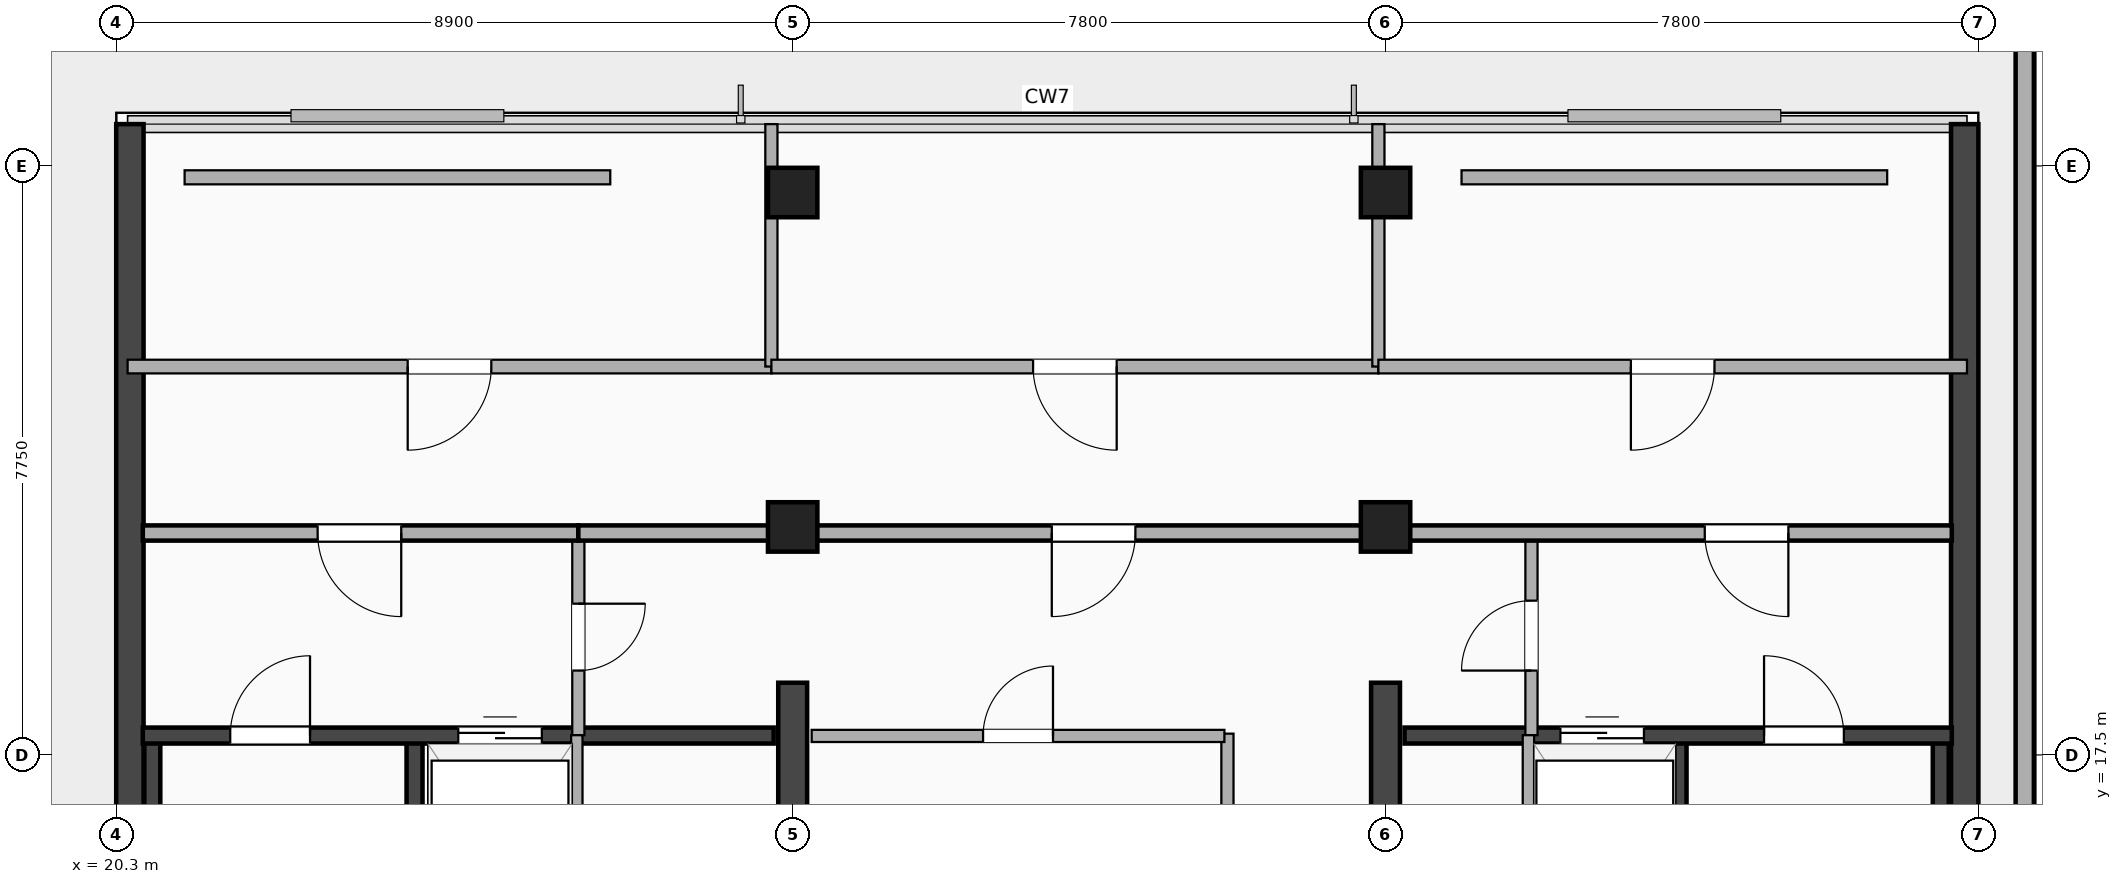
"""IFC4 building model, lengths in metres.
Left out: names, types, materials, properties, quantities, classifications, styles, units other than length and angle.
Written with IfcOpenShell. Run it as: python <this file> out.ifc"""

import sys

from ifc_helpers import new_model, si_unit, direction, frame, frame_2d, origin, origin_2d, place, context, subcontext, project, spatial, rectangle, extrude, element, fill, save


model = new_model("IFC4")
c1 = context("Model", 3, precision=1e-05, world=origin(), true_north=direction((0.0, 1.0)))
c2 = subcontext(c1, "Body", "Model", "MODEL_VIEW")
j1 = project(units=[si_unit("LENGTHUNIT", "METRE"), si_unit("PLANEANGLEUNIT", "RADIAN")], contexts=[c1])
p1 = place(None, origin())
s1 = spatial("IfcSite", under=j1, at=p1, CompositionType="ELEMENT")
p2 = place(p1, origin())
s2 = spatial("IfcBuilding", under=s1, at=p2, CompositionType="ELEMENT")
p3 = place(p2, frame((0.0, 0.0, 307.9)))
s3 = spatial("IfcBuildingStorey", under=s2, at=p3, CompositionType="ELEMENT", Elevation=307.9)
for number, where, z_axis, x_axis in (
    (1, (20.48, 3.5, 0.0), (0.0, 0.0, 1.0), (0.0, 1.0, 0.0)),
    (2, (44.62, 3.5, 0.0), (0.0, 0.0, 1.0), (0.0, 1.0, 0.0)),
):
    element("IfcWall", number, at=place(p3, frame(where, z_axis=z_axis, x_axis=x_axis)), inside=s3, PredefinedType="SHEAR", context=c2, shape_type="SweptSolid", body=[
        extrude(rectangle(XDim=22.3, YDim=0.36, at=frame_2d((11.15, 0.0))), origin(), (0.0, 0.0, 1.0), 4.3),
    ])
p4 = place(p3, frame((29.2, 3.5, 0.0), z_axis=(0.0, 0.0, 1.0), x_axis=(0.0, 1.0, 0.0)))
e3 = element("IfcWall", 3, at=p4, inside=s3, PredefinedType="SHEAR", context=c2, shape_type="SweptSolid", body=[
    extrude(rectangle(XDim=14.95, YDim=0.38, at=frame_2d((7.475, 0.0))), origin(), (0.0, 0.0, 1.0), 4.3),
])
p5 = place(p4, frame((7.75, 0.0, 0.0), z_axis=(0.0, 0.0, 1.0), x_axis=(-1.0, 0.0, 0.0)))
e4 = element("IfcOpeningElement", 4, at=p5, cuts=e3, PredefinedType="OPENING", context=c2, shape_type="SweptSolid", body=[
    extrude(rectangle(XDim=1.1, YDim=2.15, at=frame_2d((0.55, 1.075))), frame((0.0, 0.2, 0.0), z_axis=(0.0, -1.0, 0.0), x_axis=(1.0, 0.0, 0.0)), (0.0, 0.0, 1.0), 0.4),
])
p6 = place(p3, frame((37.0, 3.5, 0.0), z_axis=(0.0, 0.0, 1.0), x_axis=(0.0, 1.0, 0.0)))
e5 = element("IfcWall", 5, at=p6, inside=s3, PredefinedType="SHEAR", context=c2, shape_type="SweptSolid", body=[
    extrude(rectangle(XDim=14.95, YDim=0.38, at=frame_2d((7.475, 0.0))), origin(), (0.0, 0.0, 1.0), 4.3),
])
p7 = place(p6, frame((6.65, 0.0, 0.0)))
e6 = element("IfcOpeningElement", 6, at=p7, cuts=e5, PredefinedType="OPENING", context=c2, shape_type="SweptSolid", body=[
    extrude(rectangle(XDim=1.1, YDim=2.15, at=frame_2d((0.55, 1.075))), frame((0.0, 0.2, 0.0), z_axis=(0.0, -1.0, 0.0), x_axis=(1.0, 0.0, 0.0)), (0.0, 0.0, 1.0), 0.4),
])
for number, where, z_axis, x_axis in (
    (7, (20.775, 9.745, 0.0), (0.0, 0.0, 1.0), (0.0, 1.0, 0.0)),
    (8, (24.225, 9.745, 0.0), (0.0, 0.0, 1.0), (0.0, 1.0, 0.0)),
):
    element("IfcWall", number, at=place(p3, frame(where, z_axis=z_axis, x_axis=x_axis)), inside=s3, PredefinedType="SHEAR", context=c2, shape_type="SweptSolid", body=[
        extrude(rectangle(XDim=8.01, YDim=0.21, at=frame_2d((4.005, 0.0))), origin(), (0.0, 0.0, 1.0), 4.3),
    ])
p8 = place(p3, frame((20.65, 17.755, 0.0), z_axis=(0.0, 0.0, 1.0), x_axis=(1.0, 0.0, 0.0)))
e9 = element("IfcWall", 9, at=p8, inside=s3, PredefinedType="SHEAR", context=c2, shape_type="SweptSolid", body=[
    extrude(rectangle(XDim=8.3, YDim=0.21, at=frame_2d((4.15, 0.0))), origin(), (0.0, 0.0, 1.0), 4.3),
])
p9 = place(p8, frame((2.2, 0.0, 0.0), z_axis=(0.0, 0.0, 1.0), x_axis=(-1.0, 0.0, 0.0)))
e10 = element("IfcOpeningElement", 10, at=p9, cuts=e9, PredefinedType="OPENING", context=c2, shape_type="SweptSolid", body=[
    extrude(rectangle(XDim=1.05, YDim=2.15, at=frame_2d((0.525, 1.075))), frame((0.0, 0.115, 0.0), z_axis=(0.0, -1.0, 0.0), x_axis=(1.0, 0.0, 0.0)), (0.0, 0.0, 1.0), 0.23),
])
p10 = place(p8, frame((4.15, 0.0, 0.0)))
e11 = element("IfcOpeningElement", 11, at=p10, cuts=e9, PredefinedType="OPENING", context=c2, shape_type="SweptSolid", body=[
    extrude(rectangle(XDim=1.1, YDim=2.18, at=frame_2d((0.55, 1.09))), frame((0.0, 0.115, 0.0), z_axis=(0.0, -1.0, 0.0), x_axis=(1.0, 0.0, 0.0)), (0.0, 0.0, 1.0), 0.23),
])
for number, where, z_axis, x_axis in (
    (12, (40.855, 9.745, 0.0), (0.0, 0.0, 1.0), (0.0, 1.0, 0.0)),
    (13, (44.305, 9.745, 0.0), (0.0, 0.0, 1.0), (0.0, 1.0, 0.0)),
):
    element("IfcWall", number, at=place(p3, frame(where, z_axis=z_axis, x_axis=x_axis)), inside=s3, PredefinedType="SHEAR", context=c2, shape_type="SweptSolid", body=[
        extrude(rectangle(XDim=8.01, YDim=0.21, at=frame_2d((4.005, 0.0))), origin(), (0.0, 0.0, 1.0), 4.3),
    ])
p11 = place(p3, frame((37.25, 17.755, 0.0), z_axis=(0.0, 0.0, 1.0), x_axis=(1.0, 0.0, 0.0)))
e14 = element("IfcWall", 14, at=p11, inside=s3, PredefinedType="SHEAR", context=c2, shape_type="SweptSolid", body=[
    extrude(rectangle(XDim=7.2, YDim=0.21, at=frame_2d((3.6, 0.0))), origin(), (0.0, 0.0, 1.0), 4.3),
])
p12 = place(p11, frame((2.05, 0.0, 0.0)))
e15 = element("IfcOpeningElement", 15, at=p12, cuts=e14, PredefinedType="OPENING", context=c2, shape_type="SweptSolid", body=[
    extrude(rectangle(XDim=1.1, YDim=2.18, at=frame_2d((0.55, 1.09))), frame((0.0, 0.115, 0.0), z_axis=(0.0, -1.0, 0.0), x_axis=(1.0, 0.0, 0.0)), (0.0, 0.0, 1.0), 0.23),
])
p13 = place(p11, frame((5.78, 0.0, 0.0), z_axis=(0.0, 0.0, 1.0), x_axis=(-1.0, 0.0, 0.0)))
e16 = element("IfcOpeningElement", 16, at=p13, cuts=e14, PredefinedType="OPENING", context=c2, shape_type="SweptSolid", body=[
    extrude(rectangle(XDim=1.05, YDim=2.15, at=frame_2d((0.525, 1.075))), frame((0.0, 0.115, 0.0), z_axis=(0.0, -1.0, 0.0), x_axis=(1.0, 0.0, 0.0)), (0.0, 0.0, 1.0), 0.23),
])
for number, where, z_axis, x_axis in (
    (17, (29.2, 20.5, -0.3), (0.0, 0.0, 1.0), (1.0, 0.0, 0.0)),
    (18, (37.0, 20.5, -0.3), (0.0, 0.0, 1.0), (1.0, 0.0, 0.0)),
    (19, (29.2, 24.9, -0.3), (0.0, 0.0, 1.0), (1.0, 0.0, 0.0)),
    (20, (37.0, 24.9, -0.3), (0.0, 0.0, 1.0), (1.0, 0.0, 0.0)),
):
    element("IfcColumn", number, at=place(p3, frame(where, z_axis=z_axis, x_axis=x_axis)), inside=s3, PredefinedType="COLUMN", context=c2, shape_type="SweptSolid", body=[
        extrude(rectangle(XDim=0.65, YDim=0.65, at=origin_2d()), origin(), (0.0, 0.0, 1.0), 4.6),
    ])
p14 = place(p3, frame((45.41, 3.5, 0.0), z_axis=(0.0, 0.0, 1.0), x_axis=(0.0, 1.0, 0.0)))
e21 = element("IfcWall", 21, at=p14, inside=s3, PredefinedType="PARAPET", context=c2, shape_type="SweptSolid", body=[
    extrude(rectangle(XDim=23.6, YDim=0.24, at=frame_2d((11.8, 0.0))), origin(), (0.0, 0.0, 1.0), 1.25),
])
for number, where, z_axis, x_axis in (
    (22, (21.2, 25.1, 0.0), (0.0, 0.0, 1.0), (1.0, 0.0, 0.0)),
    (23, (38.0, 25.1, 0.0), (0.0, 0.0, 1.0), (1.0, 0.0, 0.0)),
):
    element("IfcWall", number, at=place(p3, frame(where, z_axis=z_axis, x_axis=x_axis)), inside=s3, PredefinedType="ELEMENTEDWALL", context=c2, shape_type="SweptSolid", body=[
        extrude(rectangle(XDim=5.6, YDim=0.185, at=frame_2d((2.8, 0.0))), origin(), (0.0, 0.0, 1.0), 3.885),
    ])
p15 = place(p3, frame((26.38, 17.76, 0.0), z_axis=(0.0, 0.0, 1.0), x_axis=(0.0, 1.0, 0.0)))
e24 = element("IfcWall", 24, at=p15, inside=s3, PredefinedType="PARTITIONING", context=c2, shape_type="SweptSolid", body=[
    extrude(rectangle(XDim=2.66, YDim=0.16, at=frame_2d((1.33, 0.0))), origin(), (0.0, 0.0, 1.0), 4.3),
])
p16 = place(p15, frame((0.85, 0.0, 0.0)))
e25 = element("IfcOpeningElement", 25, at=p16, cuts=e24, PredefinedType="OPENING", context=c2, shape_type="SweptSolid", body=[
    extrude(rectangle(XDim=0.88, YDim=2.08, at=frame_2d((0.44, 1.04))), frame((0.0, 0.09, 0.0), z_axis=(0.0, -1.0, 0.0), x_axis=(1.0, 0.0, 0.0)), (0.0, 0.0, 1.0), 0.18),
])
p17 = place(p3, frame((38.92, 17.76, 0.0), z_axis=(0.0, 0.0, 1.0), x_axis=(0.0, 1.0, 0.0)))
e26 = element("IfcWall", 26, at=p17, inside=s3, PredefinedType="PARTITIONING", context=c2, shape_type="SweptSolid", body=[
    extrude(rectangle(XDim=2.66, YDim=0.16, at=frame_2d((1.33, 0.0))), origin(), (0.0, 0.0, 1.0), 4.3),
])
p18 = place(p17, frame((1.77, 0.0, 0.0), z_axis=(0.0, 0.0, 1.0), x_axis=(-1.0, 0.0, 0.0)))
e27 = element("IfcOpeningElement", 27, at=p18, cuts=e26, PredefinedType="OPENING", context=c2, shape_type="SweptSolid", body=[
    extrude(rectangle(XDim=0.92, YDim=2.08, at=frame_2d((0.46, 1.04))), frame((0.0, 0.09, 0.0), z_axis=(0.0, -1.0, 0.0), x_axis=(1.0, 0.0, 0.0)), (0.0, 0.0, 1.0), 0.18),
])
for number, where, z_axis, x_axis in (
    (28, (26.36, 14.72, 0.0), (0.0, 0.0, 1.0), (0.0, 1.0, 0.0)),
    (29, (38.88, 14.72, 0.0), (0.0, 0.0, 1.0), (0.0, 1.0, 0.0)),
):
    element("IfcWall", number, at=place(p3, frame(where, z_axis=z_axis, x_axis=x_axis)), inside=s3, PredefinedType="PARTITIONING", context=c2, shape_type="SweptSolid", body=[
        extrude(rectangle(XDim=3.04, YDim=0.15, at=frame_2d((1.52, 0.0))), origin(), (0.0, 0.0, 1.0), 4.3),
    ])
p19 = place(p3, frame((20.65, 20.42, 0.0), z_axis=(0.0, 0.0, 1.0), x_axis=(1.0, 0.0, 0.0)))
e30 = element("IfcWall", 30, at=p19, inside=s3, PredefinedType="PARTITIONING", context=c2, shape_type="SweptSolid", body=[
    extrude(rectangle(XDim=5.73, YDim=0.2, at=frame_2d((2.865, 0.0))), origin(), (0.0, 0.0, 1.0), 4.3),
])
p20 = place(p19, frame((2.3, 0.0, 0.0)))
e31 = element("IfcOpeningElement", 31, at=p20, cuts=e30, PredefinedType="OPENING", context=c2, shape_type="SweptSolid", body=[
    extrude(rectangle(XDim=1.1, YDim=2.15, at=frame_2d((0.55, 1.075))), frame((0.0, 0.11, 0.0), z_axis=(0.0, -1.0, 0.0), x_axis=(1.0, 0.0, 0.0)), (0.0, 0.0, 1.0), 0.22),
])
p21 = place(p3, frame((26.38, 20.42, 0.0), z_axis=(0.0, 0.0, 1.0), x_axis=(1.0, 0.0, 0.0)))
e32 = element("IfcWall", 32, at=p21, inside=s3, PredefinedType="PARTITIONING", context=c2, shape_type="SweptSolid", body=[
    extrude(rectangle(XDim=2.82, YDim=0.2, at=frame_2d((1.41, 0.0))), origin(), (0.0, 0.0, 1.0), 2.605),
])
p22 = place(p3, frame((29.2, 20.42, 0.0), z_axis=(0.0, 0.0, 1.0), x_axis=(1.0, 0.0, 0.0)))
e33 = element("IfcWall", 33, at=p22, inside=s3, PredefinedType="PARTITIONING", context=c2, shape_type="SweptSolid", body=[
    extrude(rectangle(XDim=7.8, YDim=0.2, at=frame_2d((3.9, 0.0))), origin(), (0.0, 0.0, 1.0), 2.605),
])
p23 = place(p22, frame((3.409, 0.0, 0.0)))
e34 = element("IfcOpeningElement", 34, at=p23, cuts=e33, PredefinedType="OPENING", context=c2, shape_type="SweptSolid", body=[
    extrude(rectangle(XDim=1.1, YDim=2.15, at=frame_2d((0.55, 1.075))), frame((0.0, 0.11, 0.0), z_axis=(0.0, -1.0, 0.0), x_axis=(1.0, 0.0, 0.0)), (0.0, 0.0, 1.0), 0.22),
])
p24 = place(p3, frame((37.0, 20.42, 0.0), z_axis=(0.0, 0.0, 1.0), x_axis=(1.0, 0.0, 0.0)))
e35 = element("IfcWall", 35, at=p24, inside=s3, PredefinedType="PARTITIONING", context=c2, shape_type="SweptSolid", body=[
    extrude(rectangle(XDim=7.45, YDim=0.2, at=frame_2d((3.725, 0.0))), origin(), (0.0, 0.0, 1.0), 2.605),
])
p25 = place(p24, frame((4.2, 0.0, 0.0)))
e36 = element("IfcOpeningElement", 36, at=p25, cuts=e35, PredefinedType="OPENING", context=c2, shape_type="SweptSolid", body=[
    extrude(rectangle(XDim=1.1, YDim=2.15, at=frame_2d((0.55, 1.075))), frame((0.0, 0.11, 0.0), z_axis=(0.0, -1.0, 0.0), x_axis=(1.0, 0.0, 0.0)), (0.0, 0.0, 1.0), 0.22),
])
p26 = place(p3, frame((34.92, 11.68, 0.0), z_axis=(0.0, 0.0, 1.0), x_axis=(0.0, 1.0, 0.0)))
e37 = element("IfcWall", 37, at=p26, inside=s3, PredefinedType="PARTITIONING", context=c2, shape_type="SweptSolid", body=[
    extrude(rectangle(XDim=6.1, YDim=0.16, at=frame_2d((3.05, 0.0))), origin(), (0.0, 0.0, 1.0), 4.3),
])
p27 = place(p3, frame((29.45, 17.75, 0.0), z_axis=(0.0, 0.0, 1.0), x_axis=(1.0, 0.0, 0.0)))
e38 = element("IfcWall", 38, at=p27, inside=s3, PredefinedType="PARTITIONING", context=c2, shape_type="SweptSolid", body=[
    extrude(rectangle(XDim=5.43, YDim=0.16, at=frame_2d((2.715, 0.0))), origin(), (0.0, 0.0, 1.0), 4.3),
])
p28 = place(p27, frame((3.175, 0.0, 0.0), z_axis=(0.0, 0.0, 1.0), x_axis=(-1.0, 0.0, 0.0)))
e39 = element("IfcOpeningElement", 39, at=p28, cuts=e38, PredefinedType="OPENING", context=c2, shape_type="SweptSolid", body=[
    extrude(rectangle(XDim=0.92, YDim=2.08, at=frame_2d((0.46, 1.04))), frame((0.0, 0.09, 0.0), z_axis=(0.0, -1.0, 0.0), x_axis=(1.0, 0.0, 0.0)), (0.0, 0.0, 1.0), 0.18),
])
p29 = place(p3, frame((20.45, 22.61, 0.0), z_axis=(0.0, 0.0, 1.0), x_axis=(1.0, 0.0, 0.0)))
e40 = element("IfcWall", 40, at=p29, inside=s3, PredefinedType="PARTITIONING", context=c2, shape_type="SweptSolid", body=[
    extrude(rectangle(XDim=8.47, YDim=0.18, at=frame_2d((4.235, 0.0))), origin(), (0.0, 0.0, 1.0), 2.605),
])
p30 = place(p29, frame((3.685, 0.0, 0.0)))
e41 = element("IfcOpeningElement", 41, at=p30, cuts=e40, PredefinedType="OPENING", context=c2, shape_type="SweptSolid", body=[
    extrude(rectangle(XDim=1.1, YDim=2.15, at=frame_2d((0.55, 1.075))), frame((0.0, 0.1, 0.0), z_axis=(0.0, -1.0, 0.0), x_axis=(1.0, 0.0, 0.0)), (0.0, 0.0, 1.0), 0.2),
])
p31 = place(p3, frame((28.92, 22.61, 0.0), z_axis=(0.0, 0.0, 1.0), x_axis=(0.0, 1.0, 0.0)))
e42 = element("IfcWall", 42, at=p31, inside=s3, PredefinedType="PARTITIONING", context=c2, shape_type="SweptSolid", body=[
    extrude(rectangle(XDim=3.19, YDim=0.16, at=frame_2d((1.595, 0.0))), origin(), (0.0, 0.0, 1.0), 2.605),
])
p32 = place(p3, frame((28.92, 22.61, 0.0), z_axis=(0.0, 0.0, 1.0), x_axis=(1.0, 0.0, 0.0)))
e43 = element("IfcWall", 43, at=p32, inside=s3, PredefinedType="PARTITIONING", context=c2, shape_type="SweptSolid", body=[
    extrude(rectangle(XDim=7.986, YDim=0.18, at=frame_2d((3.993, 0.0))), origin(), (0.0, 0.0, 1.0), 2.605),
])
p33 = place(p32, frame((3.443, 0.0, 0.0)))
e44 = element("IfcOpeningElement", 44, at=p33, cuts=e43, PredefinedType="OPENING", context=c2, shape_type="SweptSolid", body=[
    extrude(rectangle(XDim=1.1, YDim=2.15, at=frame_2d((0.55, 1.075))), frame((0.0, 0.1, 0.0), z_axis=(0.0, -1.0, 0.0), x_axis=(1.0, 0.0, 0.0)), (0.0, 0.0, 1.0), 0.2),
])
p34 = place(p3, frame((36.906, 22.61, 0.0), z_axis=(0.0, 0.0, 1.0), x_axis=(0.0, 1.0, 0.0)))
e45 = element("IfcWall", 45, at=p34, inside=s3, PredefinedType="PARTITIONING", context=c2, shape_type="SweptSolid", body=[
    extrude(rectangle(XDim=3.19, YDim=0.16, at=frame_2d((1.595, 0.0))), origin(), (0.0, 0.0, 1.0), 2.605),
])
p35 = place(p3, frame((36.906, 22.61, 0.0), z_axis=(0.0, 0.0, 1.0), x_axis=(1.0, 0.0, 0.0)))
e46 = element("IfcWall", 46, at=p35, inside=s3, PredefinedType="PARTITIONING", context=c2, shape_type="SweptSolid", body=[
    extrude(rectangle(XDim=7.744, YDim=0.18, at=frame_2d((3.872, 0.0))), origin(), (0.0, 0.0, 1.0), 2.605),
])
p36 = place(p35, frame((3.322, 0.0, 0.0)))
e47 = element("IfcOpeningElement", 47, at=p36, cuts=e46, PredefinedType="OPENING", context=c2, shape_type="SweptSolid", body=[
    extrude(rectangle(XDim=1.1, YDim=2.15, at=frame_2d((0.55, 1.075))), frame((0.0, 0.1, 0.0), z_axis=(0.0, -1.0, 0.0), x_axis=(1.0, 0.0, 0.0)), (0.0, 0.0, 1.0), 0.2),
])
p37 = place(p9, origin())
e48 = element("IfcDoor", 48, at=p37, inside=s3, OperationType="SINGLE_SWING_RIGHT", PredefinedType="DOOR", context=c2, shape_type="SweptSolid", body=[
    extrude(rectangle(XDim=1.05, YDim=2.15, at=frame_2d((0.525, 1.075))), frame((0.0, 0.025, 0.0), z_axis=(0.0, -1.0, 0.0), x_axis=(1.0, 0.0, 0.0)), (0.0, 0.0, 1.0), 0.05),
])
fill(e10, e48)
p38 = place(p10, origin())
e49 = element("IfcDoor", 49, at=p38, inside=s3, OperationType="DOUBLE_DOOR_SLIDING", PredefinedType="DOOR", context=c2, shape_type="SweptSolid", body=[
    extrude(rectangle(XDim=1.1, YDim=2.18, at=frame_2d((0.55, 1.09))), frame((0.0, 0.025, 0.0), z_axis=(0.0, -1.0, 0.0), x_axis=(1.0, 0.0, 0.0)), (0.0, 0.0, 1.0), 0.05),
])
fill(e11, e49)
p39 = place(p12, origin())
e50 = element("IfcDoor", 50, at=p39, inside=s3, OperationType="DOUBLE_DOOR_SLIDING", PredefinedType="DOOR", context=c2, shape_type="SweptSolid", body=[
    extrude(rectangle(XDim=1.1, YDim=2.18, at=frame_2d((0.55, 1.09))), frame((0.0, 0.025, 0.0), z_axis=(0.0, -1.0, 0.0), x_axis=(1.0, 0.0, 0.0)), (0.0, 0.0, 1.0), 0.05),
])
fill(e15, e50)
p40 = place(p13, origin())
e51 = element("IfcDoor", 51, at=p40, inside=s3, OperationType="SINGLE_SWING_LEFT", PredefinedType="DOOR", context=c2, shape_type="SweptSolid", body=[
    extrude(rectangle(XDim=1.05, YDim=2.15, at=frame_2d((0.525, 1.075))), frame((0.0, 0.025, 0.0), z_axis=(0.0, -1.0, 0.0), x_axis=(1.0, 0.0, 0.0)), (0.0, 0.0, 1.0), 0.05),
])
fill(e16, e51)
p41 = place(p16, origin())
e52 = element("IfcDoor", 52, at=p41, inside=s3, OperationType="SINGLE_SWING_RIGHT", PredefinedType="DOOR", context=c2, shape_type="SweptSolid", body=[
    extrude(rectangle(XDim=0.88, YDim=2.08, at=frame_2d((0.44, 1.04))), frame((0.0, 0.025, 0.0), z_axis=(0.0, -1.0, 0.0), x_axis=(1.0, 0.0, 0.0)), (0.0, 0.0, 1.0), 0.05),
])
fill(e25, e52)
p42 = place(p18, origin())
e53 = element("IfcDoor", 53, at=p42, inside=s3, OperationType="SINGLE_SWING_LEFT", PredefinedType="DOOR", context=c2, shape_type="SweptSolid", body=[
    extrude(rectangle(XDim=0.92, YDim=2.08, at=frame_2d((0.46, 1.04))), frame((0.0, 0.025, 0.0), z_axis=(0.0, -1.0, 0.0), x_axis=(1.0, 0.0, 0.0)), (0.0, 0.0, 1.0), 0.05),
])
fill(e27, e53)
p43 = place(p20, origin())
e54 = element("IfcDoor", 54, at=p43, inside=s3, OperationType="SINGLE_SWING_RIGHT", PredefinedType="DOOR", context=c2, shape_type="SweptSolid", body=[
    extrude(rectangle(XDim=1.1, YDim=2.15, at=frame_2d((0.55, 1.075))), frame((0.0, 0.025, 0.0), z_axis=(0.0, -1.0, 0.0), x_axis=(1.0, 0.0, 0.0)), (0.0, 0.0, 1.0), 0.05),
])
fill(e31, e54)
p44 = place(p23, origin())
e55 = element("IfcDoor", 55, at=p44, inside=s3, OperationType="SINGLE_SWING_LEFT", PredefinedType="DOOR", context=c2, shape_type="SweptSolid", body=[
    extrude(rectangle(XDim=1.1, YDim=2.15, at=frame_2d((0.55, 1.075))), frame((0.0, 0.025, 0.0), z_axis=(0.0, -1.0, 0.0), x_axis=(1.0, 0.0, 0.0)), (0.0, 0.0, 1.0), 0.05),
])
fill(e34, e55)
p45 = place(p25, origin())
e56 = element("IfcDoor", 56, at=p45, inside=s3, OperationType="SINGLE_SWING_RIGHT", PredefinedType="DOOR", context=c2, shape_type="SweptSolid", body=[
    extrude(rectangle(XDim=1.1, YDim=2.15, at=frame_2d((0.55, 1.075))), frame((0.0, 0.025, 0.0), z_axis=(0.0, -1.0, 0.0), x_axis=(1.0, 0.0, 0.0)), (0.0, 0.0, 1.0), 0.05),
])
fill(e36, e56)
p46 = place(p28, origin())
e57 = element("IfcDoor", 57, at=p46, inside=s3, OperationType="SINGLE_SWING_RIGHT", PredefinedType="DOOR", context=c2, shape_type="SweptSolid", body=[
    extrude(rectangle(XDim=0.92, YDim=2.08, at=frame_2d((0.46, 1.04))), frame((0.0, 0.025, 0.0), z_axis=(0.0, -1.0, 0.0), x_axis=(1.0, 0.0, 0.0)), (0.0, 0.0, 1.0), 0.05),
])
fill(e39, e57)
p47 = place(p30, origin())
e58 = element("IfcDoor", 58, at=p47, inside=s3, OperationType="SINGLE_SWING_LEFT", PredefinedType="DOOR", context=c2, shape_type="SweptSolid", body=[
    extrude(rectangle(XDim=1.1, YDim=2.15, at=frame_2d((0.55, 1.075))), frame((0.0, 0.025, 0.0), z_axis=(0.0, -1.0, 0.0), x_axis=(1.0, 0.0, 0.0)), (0.0, 0.0, 1.0), 0.05),
])
fill(e41, e58)
p48 = place(p33, origin())
e59 = element("IfcDoor", 59, at=p48, inside=s3, OperationType="SINGLE_SWING_RIGHT", PredefinedType="DOOR", context=c2, shape_type="SweptSolid", body=[
    extrude(rectangle(XDim=1.1, YDim=2.15, at=frame_2d((0.55, 1.075))), frame((0.0, 0.025, 0.0), z_axis=(0.0, -1.0, 0.0), x_axis=(1.0, 0.0, 0.0)), (0.0, 0.0, 1.0), 0.05),
])
fill(e44, e59)
p49 = place(p36, origin())
e60 = element("IfcDoor", 60, at=p49, inside=s3, OperationType="SINGLE_SWING_LEFT", PredefinedType="DOOR", context=c2, shape_type="SweptSolid", body=[
    extrude(rectangle(XDim=1.1, YDim=2.15, at=frame_2d((0.55, 1.075))), frame((0.0, 0.025, 0.0), z_axis=(0.0, -1.0, 0.0), x_axis=(1.0, 0.0, 0.0)), (0.0, 0.0, 1.0), 0.05),
])
fill(e47, e60)
save(model, sys.argv[1])
